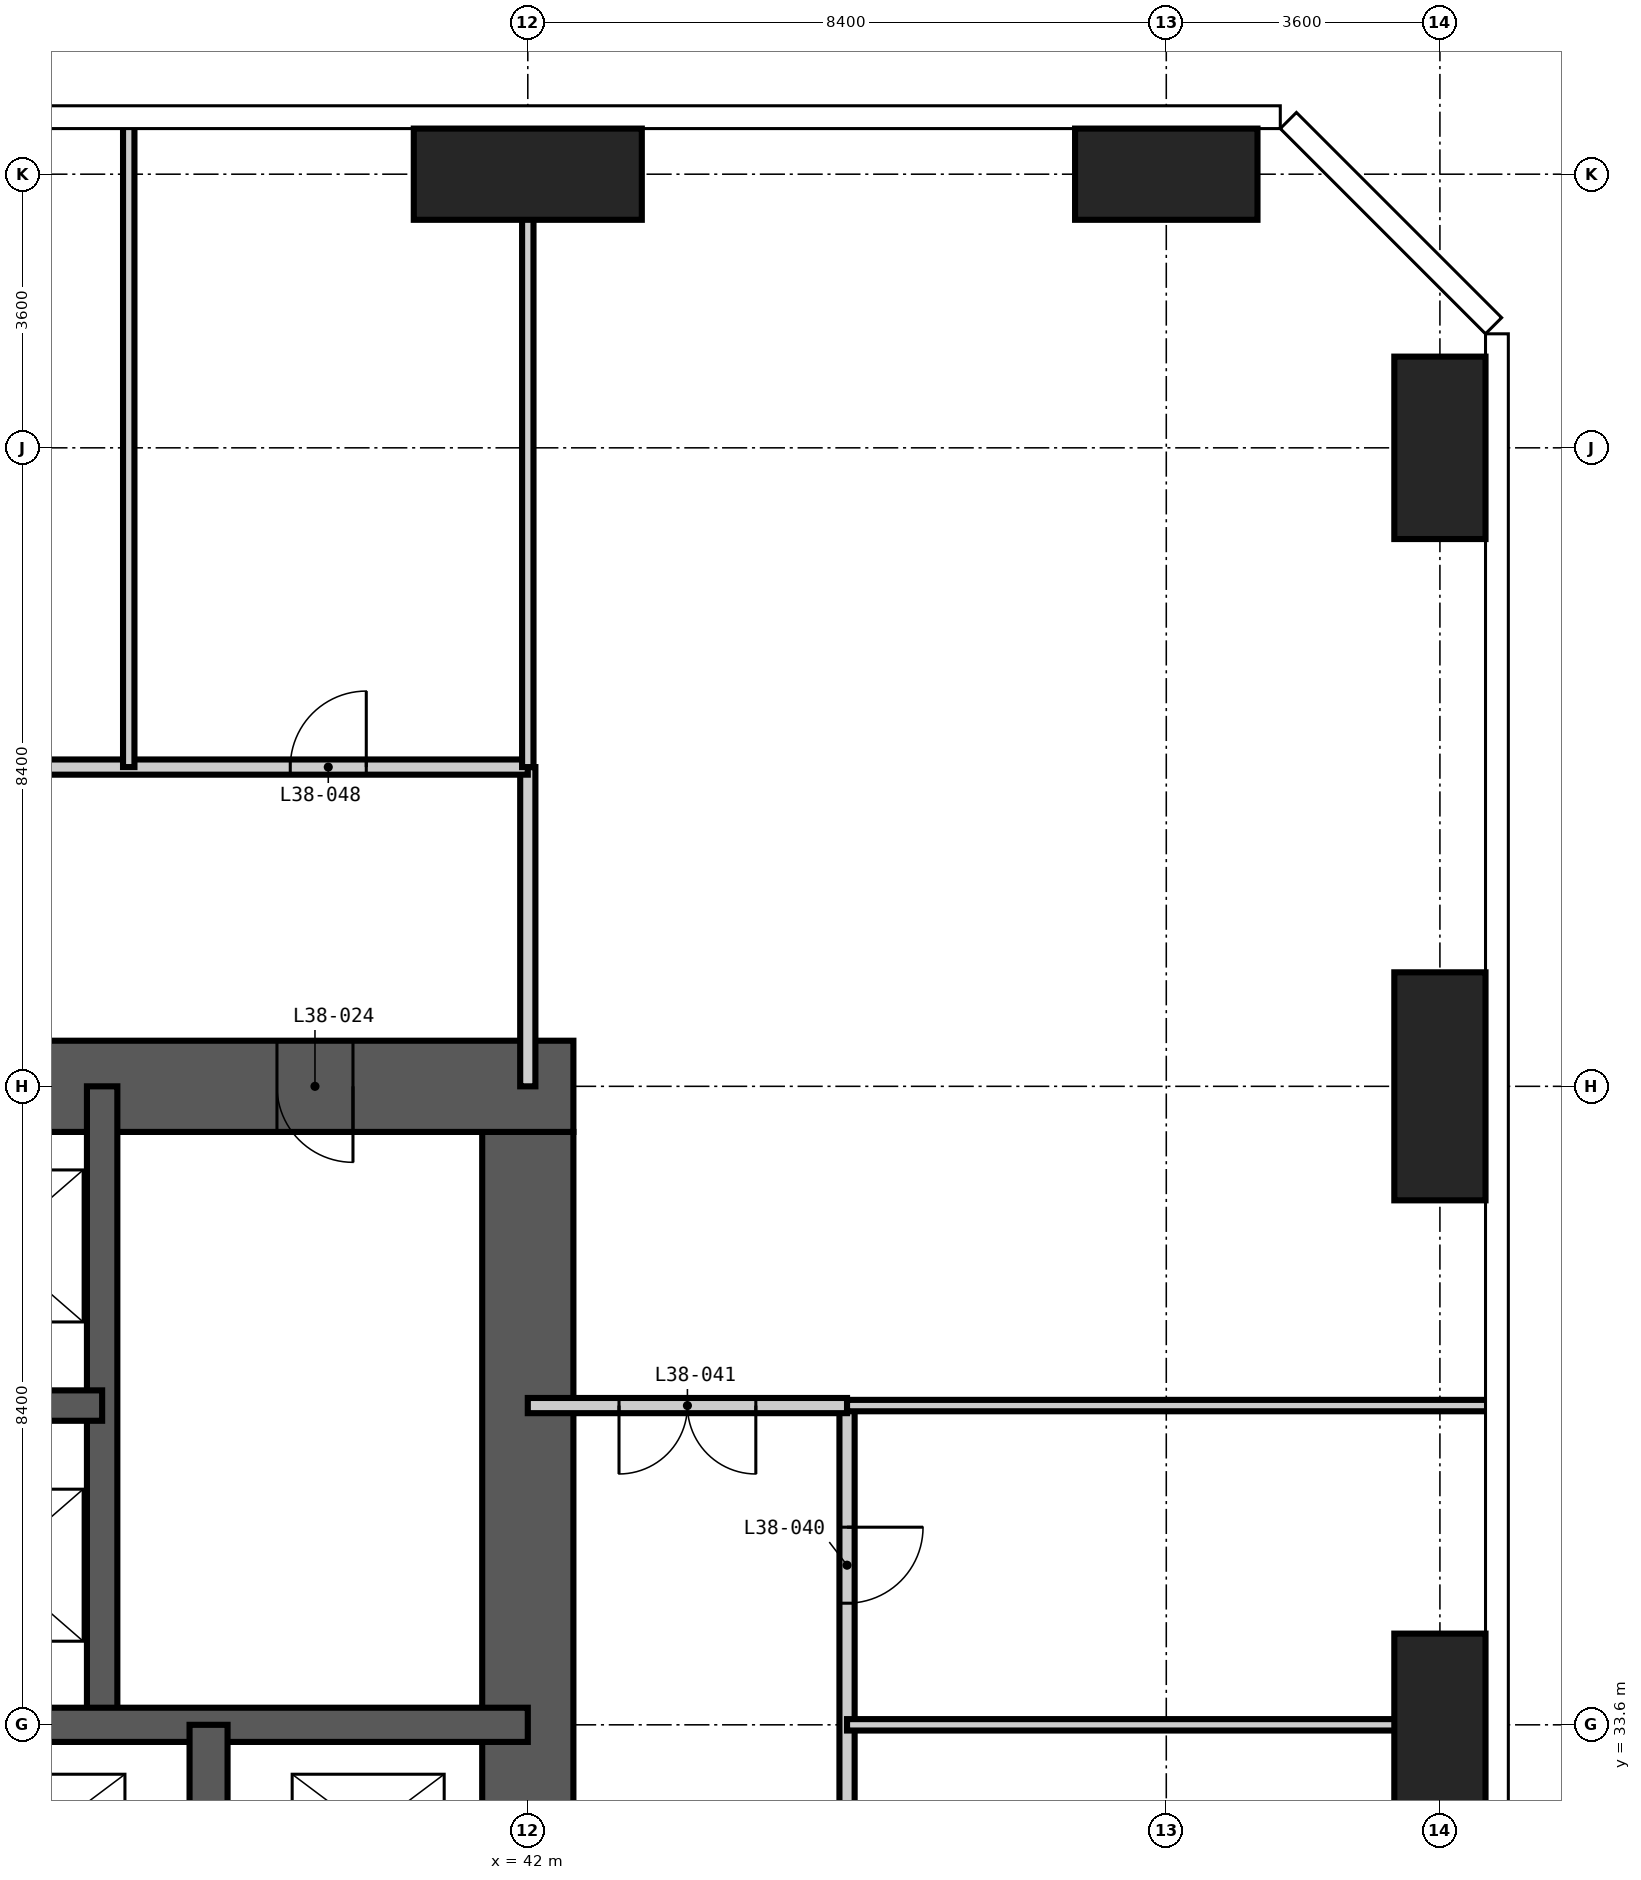
"""IFC4 building model, lengths in metres.
Left out: names, types, materials, properties, quantities, classifications, styles, units other than length and angle.
Written with IfcOpenShell. Run it as: python <this file> out.ifc"""

import sys

from ifc_helpers import new_model, si_unit, direction, frame, frame_2d, origin, origin_2d, place, context, subcontext, project, spatial, rectangle, extrude, element, fill, save


model = new_model("IFC4")
c1 = context("Model", 3, precision=1e-05, world=origin(), true_north=direction((0.0, 1.0)))
c2 = subcontext(c1, "Body", "Model", "MODEL_VIEW")
j1 = project(units=[si_unit("LENGTHUNIT", "METRE"), si_unit("PLANEANGLEUNIT", "RADIAN")], contexts=[c1])
p1 = place(None, origin())
s1 = spatial("IfcSite", under=j1, at=p1, CompositionType="ELEMENT")
p2 = place(p1, origin())
s2 = spatial("IfcBuilding", under=s1, at=p2, CompositionType="ELEMENT")
p3 = place(p2, frame((0.0, 0.0, 147.6)))
s3 = spatial("IfcBuildingStorey", under=s2, at=p3, CompositionType="ELEMENT", Elevation=147.6)
p4 = place(p3, frame((42.0, 54.0, -0.35), z_axis=(0.0, 0.0, 1.0), x_axis=(1.0, 0.0, 0.0)))
e1 = element("IfcColumn", 1, at=p4, inside=s3, PredefinedType="COLUMN", context=c2, shape_type="SweptSolid", body=[
    extrude(rectangle(XDim=3.0, YDim=1.2, at=origin_2d()), origin(), (0.0, 0.0, 1.0), 5.95),
])
p5 = place(p3, frame((50.4, 54.0, -0.35), z_axis=(0.0, 0.0, 1.0), x_axis=(1.0, 0.0, 0.0)))
e2 = element("IfcColumn", 2, at=p5, inside=s3, PredefinedType="COLUMN", context=c2, shape_type="SweptSolid", body=[
    extrude(rectangle(XDim=2.4, YDim=1.2, at=origin_2d()), origin(), (0.0, 0.0, 1.0), 5.95),
])
p6 = place(p3, frame((54.0, 33.6, -0.35), z_axis=(0.0, 0.0, 1.0), x_axis=(1.0, 0.0, 0.0)))
e3 = element("IfcColumn", 3, at=p6, inside=s3, PredefinedType="COLUMN", context=c2, shape_type="SweptSolid", body=[
    extrude(rectangle(XDim=1.2, YDim=2.4, at=origin_2d()), origin(), (0.0, 0.0, 1.0), 5.95),
])
p7 = place(p3, frame((54.0, 42.0, -0.35), z_axis=(0.0, 0.0, 1.0), x_axis=(1.0, 0.0, 0.0)))
e4 = element("IfcColumn", 4, at=p7, inside=s3, PredefinedType="COLUMN", context=c2, shape_type="SweptSolid", body=[
    extrude(rectangle(XDim=1.2, YDim=3.0, at=origin_2d()), origin(), (0.0, 0.0, 1.0), 5.95),
])
p8 = place(p3, frame((54.0, 50.4, -0.35), z_axis=(0.0, 0.0, 1.0), x_axis=(1.0, 0.0, 0.0)))
e5 = element("IfcColumn", 5, at=p8, inside=s3, PredefinedType="COLUMN", context=c2, shape_type="SweptSolid", body=[
    extrude(rectangle(XDim=1.2, YDim=2.4, at=origin_2d()), origin(), (0.0, 0.0, 1.0), 5.95),
])
p9 = place(p3, frame((42.0, 17.4, -0.35), z_axis=(0.0, 0.0, 1.0), x_axis=(0.0, 1.0, 0.0)))
e6 = element("IfcWall", 6, at=p9, inside=s3, PredefinedType="SHEAR", context=c2, shape_type="SweptSolid", body=[
    extrude(rectangle(XDim=24.0, YDim=1.2, at=frame_2d((12.0, 0.0))), origin(), (0.0, 0.0, 1.0), 5.95),
])
p10 = place(p9, frame((0.2, 0.0, 0.35)))
e7 = element("IfcOpeningElement", 7, at=p10, cuts=e6, PredefinedType="OPENING", context=c2, shape_type="SweptSolid", body=[
    extrude(rectangle(XDim=1.2, YDim=2.2, at=frame_2d((0.6, 1.1))), frame((0.0, 0.61, 0.0), z_axis=(0.0, -1.0, 0.0), x_axis=(1.0, 0.0, 0.0)), (0.0, 0.0, 1.0), 1.22),
])
p11 = place(p9, frame((11.1, 0.0, 0.35)))
e8 = element("IfcOpeningElement", 8, at=p11, cuts=e6, PredefinedType="OPENING", context=c2, shape_type="SweptSolid", body=[
    extrude(rectangle(XDim=1.8, YDim=2.2, at=frame_2d((0.9, 1.1))), frame((0.0, 0.61, 0.0), z_axis=(0.0, -1.0, 0.0), x_axis=(1.0, 0.0, 0.0)), (0.0, 0.0, 1.0), 1.22),
])
p12 = place(p3, frame((42.6, 42.0, -0.35), z_axis=(0.0, 0.0, 1.0), x_axis=(-1.0, 0.0, 0.0)))
e9 = element("IfcWall", 9, at=p12, inside=s3, PredefinedType="SHEAR", context=c2, shape_type="SweptSolid", body=[
    extrude(rectangle(XDim=26.4, YDim=1.2, at=frame_2d((13.2, 0.0))), origin(), (0.0, 0.0, 1.0), 5.95),
])
p13 = place(p12, frame((21.1, 0.0, 0.35)))
e10 = element("IfcOpeningElement", 10, at=p13, cuts=e9, PredefinedType="OPENING", context=c2, shape_type="SweptSolid", body=[
    extrude(rectangle(XDim=1.0, YDim=2.1, at=frame_2d((0.5, 1.05))), frame((0.0, 0.61, 0.0), z_axis=(0.0, -1.0, 0.0), x_axis=(1.0, 0.0, 0.0)), (0.0, 0.0, 1.0), 1.22),
])
p14 = place(p12, frame((10.5, 0.0, 0.35)))
e11 = element("IfcOpeningElement", 11, at=p14, cuts=e9, PredefinedType="OPENING", context=c2, shape_type="SweptSolid", body=[
    extrude(rectangle(XDim=1.2, YDim=2.2, at=frame_2d((0.6, 1.1))), frame((0.0, 0.61, 0.0), z_axis=(0.0, -1.0, 0.0), x_axis=(1.0, 0.0, 0.0)), (0.0, 0.0, 1.0), 1.22),
])
p15 = place(p12, frame((2.9, 0.0, 0.35)))
e12 = element("IfcOpeningElement", 12, at=p15, cuts=e9, PredefinedType="OPENING", context=c2, shape_type="SweptSolid", body=[
    extrude(rectangle(XDim=1.0, YDim=2.1, at=frame_2d((0.5, 1.05))), frame((0.0, 0.61, 0.0), z_axis=(0.0, -1.0, 0.0), x_axis=(1.0, 0.0, 0.0)), (0.0, 0.0, 1.0), 1.22),
])
p16 = place(p3, frame((36.4, 33.6, -0.35), z_axis=(0.0, 0.0, 1.0), x_axis=(0.0, 1.0, 0.0)))
e13 = element("IfcWall", 13, at=p16, inside=s3, PredefinedType="SHEAR", context=c2, shape_type="SweptSolid", body=[
    extrude(rectangle(XDim=8.4, YDim=0.4, at=frame_2d((4.2, 0.0))), origin(), (0.0, 0.0, 1.0), 5.95),
])
p17 = place(p3, frame((33.6, 37.8, -0.35), z_axis=(0.0, 0.0, 1.0), x_axis=(1.0, 0.0, 0.0)))
e14 = element("IfcWall", 14, at=p17, inside=s3, PredefinedType="SHEAR", context=c2, shape_type="SweptSolid", body=[
    extrude(rectangle(XDim=2.8, YDim=0.4, at=frame_2d((1.4, 0.0))), origin(), (0.0, 0.0, 1.0), 5.95),
])
p18 = place(p3, frame((16.8, 33.6, -0.35), z_axis=(0.0, 0.0, 1.0), x_axis=(1.0, 0.0, 0.0)))
e15 = element("IfcWall", 15, at=p18, inside=s3, PredefinedType="SHEAR", context=c2, shape_type="SweptSolid", body=[
    extrude(rectangle(XDim=25.2, YDim=0.45, at=frame_2d((12.6, 0.0))), origin(), (0.0, 0.0, 1.0), 5.95),
])
p19 = place(p18, frame((14.2, 0.0, 0.35)))
e16 = element("IfcOpeningElement", 16, at=p19, cuts=e15, PredefinedType="OPENING", context=c2, shape_type="SweptSolid", body=[
    extrude(rectangle(XDim=1.0, YDim=2.1, at=frame_2d((0.5, 1.05))), frame((0.0, 0.235, 0.0), z_axis=(0.0, -1.0, 0.0), x_axis=(1.0, 0.0, 0.0)), (0.0, 0.0, 1.0), 0.47),
])
p20 = place(p3, frame((37.8, 30.8, -0.35), z_axis=(0.0, 0.0, 1.0), x_axis=(0.0, 1.0, 0.0)))
e17 = element("IfcWall", 17, at=p20, inside=s3, PredefinedType="SHEAR", context=c2, shape_type="SweptSolid", body=[
    extrude(rectangle(XDim=2.8, YDim=0.5, at=frame_2d((1.4, 0.0))), origin(), (0.0, 0.0, 1.0), 5.95),
])
p21 = place(p3, frame((42.0, 42.0, 0.0), z_axis=(0.0, 0.0, 1.0), x_axis=(0.0, 1.0, 0.0)))
e18 = element("IfcWall", 18, at=p21, inside=s3, PredefinedType="PARTITIONING", context=c2, shape_type="SweptSolid", body=[
    extrude(rectangle(XDim=4.2, YDim=0.2, at=frame_2d((2.1, 0.0))), origin(), (0.0, 0.0, 1.0), 5.6),
])
p22 = place(p3, frame((46.2, 8.4, 0.0), z_axis=(0.0, 0.0, 1.0), x_axis=(0.0, 1.0, 0.0)))
e19 = element("IfcWall", 19, at=p22, inside=s3, PredefinedType="PARTITIONING", context=c2, shape_type="SweptSolid", body=[
    extrude(rectangle(XDim=29.4, YDim=0.2, at=frame_2d((14.7, 0.0))), origin(), (0.0, 0.0, 1.0), 5.6),
])
p23 = place(p22, frame((0.6, 0.0, 0.0)))
e20 = element("IfcOpeningElement", 20, at=p23, cuts=e19, PredefinedType="OPENING", context=c2, shape_type="SweptSolid", body=[
    extrude(rectangle(XDim=0.9, YDim=2.1, at=frame_2d((0.45, 1.05))), frame((0.0, 0.11, 0.0), z_axis=(0.0, -1.0, 0.0), x_axis=(1.0, 0.0, 0.0)), (0.0, 0.0, 1.0), 0.22),
])
p24 = place(p22, frame((6.9, 0.0, 0.0)))
e21 = element("IfcOpeningElement", 21, at=p24, cuts=e19, PredefinedType="OPENING", context=c2, shape_type="SweptSolid", body=[
    extrude(rectangle(XDim=0.9, YDim=2.1, at=frame_2d((0.45, 1.05))), frame((0.0, 0.11, 0.0), z_axis=(0.0, -1.0, 0.0), x_axis=(1.0, 0.0, 0.0)), (0.0, 0.0, 1.0), 0.22),
])
p25 = place(p22, frame((18.4, 0.0, 0.0)))
e22 = element("IfcOpeningElement", 22, at=p25, cuts=e19, PredefinedType="OPENING", context=c2, shape_type="SweptSolid", body=[
    extrude(rectangle(XDim=1.0, YDim=2.1, at=frame_2d((0.5, 1.05))), frame((0.0, 0.11, 0.0), z_axis=(0.0, -1.0, 0.0), x_axis=(1.0, 0.0, 0.0)), (0.0, 0.0, 1.0), 0.22),
])
p26 = place(p22, frame((26.8, 0.0, 0.0)))
e23 = element("IfcOpeningElement", 23, at=p26, cuts=e19, PredefinedType="OPENING", context=c2, shape_type="SweptSolid", body=[
    extrude(rectangle(XDim=1.0, YDim=2.1, at=frame_2d((0.5, 1.05))), frame((0.0, 0.11, 0.0), z_axis=(0.0, -1.0, 0.0), x_axis=(1.0, 0.0, 0.0)), (0.0, 0.0, 1.0), 0.22),
])
p27 = place(p3, frame((12.6, 46.2, 0.0), z_axis=(0.0, 0.0, 1.0), x_axis=(1.0, 0.0, 0.0)))
e24 = element("IfcWall", 24, at=p27, inside=s3, PredefinedType="PARTITIONING", context=c2, shape_type="SweptSolid", body=[
    extrude(rectangle(XDim=29.4, YDim=0.2, at=frame_2d((14.7, 0.0))), origin(), (0.0, 0.0, 1.0), 5.6),
])
p28 = place(p27, frame((5.55, 0.0, 0.0)))
e25 = element("IfcOpeningElement", 25, at=p28, cuts=e24, PredefinedType="OPENING", context=c2, shape_type="SweptSolid", body=[
    extrude(rectangle(XDim=0.9, YDim=2.1, at=frame_2d((0.45, 1.05))), frame((0.0, 0.11, 0.0), z_axis=(0.0, -1.0, 0.0), x_axis=(1.0, 0.0, 0.0)), (0.0, 0.0, 1.0), 0.22),
])
p29 = place(p27, frame((9.15, 0.0, 0.0)))
e26 = element("IfcOpeningElement", 26, at=p29, cuts=e24, PredefinedType="OPENING", context=c2, shape_type="SweptSolid", body=[
    extrude(rectangle(XDim=0.9, YDim=2.1, at=frame_2d((0.45, 1.05))), frame((0.0, 0.11, 0.0), z_axis=(0.0, -1.0, 0.0), x_axis=(1.0, 0.0, 0.0)), (0.0, 0.0, 1.0), 0.22),
])
p30 = place(p27, frame((12.1, 0.0, 0.0)))
e27 = element("IfcOpeningElement", 27, at=p30, cuts=e24, PredefinedType="OPENING", context=c2, shape_type="SweptSolid", body=[
    extrude(rectangle(XDim=1.0, YDim=2.1, at=frame_2d((0.5, 1.05))), frame((0.0, 0.11, 0.0), z_axis=(0.0, -1.0, 0.0), x_axis=(1.0, 0.0, 0.0)), (0.0, 0.0, 1.0), 0.22),
])
p31 = place(p27, frame((15.8, 0.0, 0.0)))
e28 = element("IfcOpeningElement", 28, at=p31, cuts=e24, PredefinedType="OPENING", context=c2, shape_type="SweptSolid", body=[
    extrude(rectangle(XDim=1.0, YDim=2.1, at=frame_2d((0.5, 1.05))), frame((0.0, 0.11, 0.0), z_axis=(0.0, -1.0, 0.0), x_axis=(1.0, 0.0, 0.0)), (0.0, 0.0, 1.0), 0.22),
])
p32 = place(p27, frame((20.975, 0.0, 0.0)))
e29 = element("IfcOpeningElement", 29, at=p32, cuts=e24, PredefinedType="OPENING", context=c2, shape_type="SweptSolid", body=[
    extrude(rectangle(XDim=1.0, YDim=2.1, at=frame_2d((0.5, 1.05))), frame((0.0, 0.11, 0.0), z_axis=(0.0, -1.0, 0.0), x_axis=(1.0, 0.0, 0.0)), (0.0, 0.0, 1.0), 0.22),
])
p33 = place(p27, frame((26.275, 0.0, 0.0)))
e30 = element("IfcOpeningElement", 30, at=p33, cuts=e24, PredefinedType="OPENING", context=c2, shape_type="SweptSolid", body=[
    extrude(rectangle(XDim=1.0, YDim=2.1, at=frame_2d((0.5, 1.05))), frame((0.0, 0.11, 0.0), z_axis=(0.0, -1.0, 0.0), x_axis=(1.0, 0.0, 0.0)), (0.0, 0.0, 1.0), 0.22),
])
p34 = place(p27, frame((1.6, 0.0, 0.0)))
e31 = element("IfcOpeningElement", 31, at=p34, cuts=e24, PredefinedType="OPENING", context=c2, shape_type="SweptSolid", body=[
    extrude(rectangle(XDim=1.0, YDim=2.1, at=frame_2d((0.5, 1.05))), frame((0.0, 0.11, 0.0), z_axis=(0.0, -1.0, 0.0), x_axis=(1.0, 0.0, 0.0)), (0.0, 0.0, 1.0), 0.22),
])
p35 = place(p3, frame((46.2, 37.8, 0.0), z_axis=(0.0, 0.0, 1.0), x_axis=(-1.0, 0.0, 0.0)))
e32 = element("IfcWall", 32, at=p35, inside=s3, PredefinedType="PARTITIONING", context=c2, shape_type="SweptSolid", body=[
    extrude(rectangle(XDim=4.2, YDim=0.2, at=frame_2d((2.1, 0.0))), origin(), (0.0, 0.0, 1.0), 5.6),
])
p36 = place(p35, frame((1.2, 0.0, 0.0)))
e33 = element("IfcOpeningElement", 33, at=p36, cuts=e32, PredefinedType="OPENING", context=c2, shape_type="SweptSolid", body=[
    extrude(rectangle(XDim=1.8, YDim=2.4, at=frame_2d((0.9, 1.2))), frame((0.0, 0.11, 0.0), z_axis=(0.0, -1.0, 0.0), x_axis=(1.0, 0.0, 0.0)), (0.0, 0.0, 1.0), 0.22),
])
for number, where, z_axis, x_axis in (
    (34, (36.75, 46.2, 0.0), (0.0, 0.0, 1.0), (0.0, 1.0, 0.0)),
    (35, (42.0, 46.2, 0.0), (0.0, 0.0, 1.0), (0.0, 1.0, 0.0)),
    (36, (46.2, 33.6, 0.0), (0.0, 0.0, 1.0), (1.0, 0.0, 0.0)),
    (37, (46.2, 37.8, 0.0), (0.0, 0.0, 1.0), (1.0, 0.0, 0.0)),
):
    element("IfcWall", number, at=place(p3, frame(where, z_axis=z_axis, x_axis=x_axis)), inside=s3, PredefinedType="PARTITIONING", context=c2, shape_type="SweptSolid", body=[
        extrude(rectangle(XDim=8.438, YDim=0.15, at=frame_2d((4.219, 0.0))), origin(), (0.0, 0.0, 1.0), 5.6),
    ])
p37 = place(p15, origin())
e38 = element("IfcDoor", 38, at=p37, inside=s3, OperationType="SINGLE_SWING_LEFT", PredefinedType="DOOR", context=c2, shape_type="SweptSolid", body=[
    extrude(rectangle(XDim=1.0, YDim=2.1, at=frame_2d((0.5, 1.05))), frame((0.0, 0.025, 0.0), z_axis=(0.0, -1.0, 0.0), x_axis=(1.0, 0.0, 0.0)), (0.0, 0.0, 1.0), 0.05),
])
fill(e12, e38)
p38 = place(p26, frame((1.0, 0.0, 0.0), z_axis=(0.0, 0.0, 1.0), x_axis=(-1.0, 0.0, 0.0)))
e39 = element("IfcDoor", 39, at=p38, inside=s3, OperationType="SINGLE_SWING_LEFT", PredefinedType="DOOR", context=c2, shape_type="SweptSolid", body=[
    extrude(rectangle(XDim=1.0, YDim=2.1, at=frame_2d((0.5, 1.05))), frame((0.0, 0.025, 0.0), z_axis=(0.0, -1.0, 0.0), x_axis=(1.0, 0.0, 0.0)), (0.0, 0.0, 1.0), 0.05),
])
fill(e23, e39)
p39 = place(p36, origin())
e40 = element("IfcDoor", 40, at=p39, inside=s3, OperationType="DOUBLE_DOOR_DOUBLE_SWING", PredefinedType="DOOR", context=c2, shape_type="SweptSolid", body=[
    extrude(rectangle(XDim=1.8, YDim=2.4, at=frame_2d((0.9, 1.2))), frame((0.0, 0.025, 0.0), z_axis=(0.0, -1.0, 0.0), x_axis=(1.0, 0.0, 0.0)), (0.0, 0.0, 1.0), 0.05),
])
fill(e33, e40)
p40 = place(p33, origin())
e41 = element("IfcDoor", 41, at=p40, inside=s3, OperationType="SINGLE_SWING_RIGHT", PredefinedType="DOOR", context=c2, shape_type="SweptSolid", body=[
    extrude(rectangle(XDim=1.0, YDim=2.1, at=frame_2d((0.5, 1.05))), frame((0.0, 0.025, 0.0), z_axis=(0.0, -1.0, 0.0), x_axis=(1.0, 0.0, 0.0)), (0.0, 0.0, 1.0), 0.05),
])
fill(e30, e41)
save(model, sys.argv[1])
